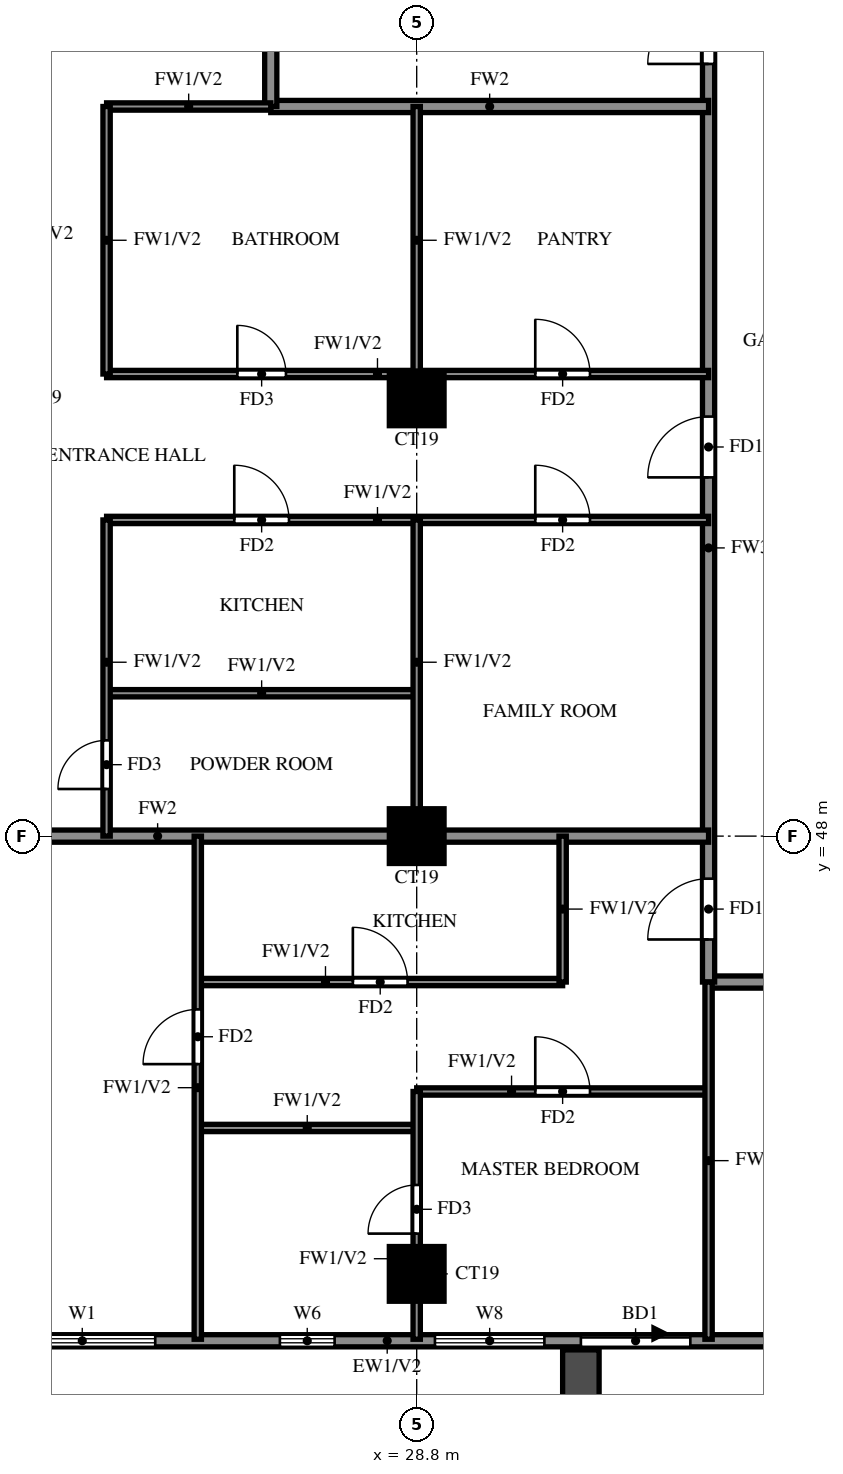
"""IFC4 building model, lengths in metres.
Left out: names, types, materials, properties, quantities, classifications, styles, units other than length and angle.
Written with IfcOpenShell. Run it as: python <this file> out.ifc"""

import sys

from ifc_helpers import new_model, si_unit, direction, frame, frame_2d, origin, origin_2d, place, context, subcontext, project, spatial, rectangle, extrude, source, transform, mapped, element, fill, save


model = new_model("IFC4")
c1 = context("Model", 3, precision=1e-05, world=origin(), true_north=direction((0.0, 1.0)))
c2 = subcontext(c1, "Body", "Model", "MODEL_VIEW")
j1 = project(units=[si_unit("LENGTHUNIT", "METRE"), si_unit("PLANEANGLEUNIT", "RADIAN")], contexts=[c1])
p1 = place(None, origin())
s1 = spatial("IfcSite", under=j1, at=p1, CompositionType="ELEMENT")
p2 = place(p1, origin())
s2 = spatial("IfcBuilding", under=s1, at=p2, CompositionType="ELEMENT")
p3 = place(p2, frame((0.0, 0.0, 195.5)))
s3 = spatial("IfcBuildingStorey", under=s2, at=p3, CompositionType="ELEMENT", Elevation=195.5)
m1 = source(origin(), c2, "Body", "SweptSolid", [
    extrude(rectangle(XDim=0.9, YDim=0.9, at=origin_2d()), origin(), (0.0, 0.0, 1.0), 3.2),
])
for number, where, z_axis, x_axis in (
    (1, (28.8, 40.8, 0.0), (0.0, 0.0, 1.0), (1.0, 0.0, 0.0)),
    (2, (28.8, 48.0, 0.0), (0.0, 0.0, 1.0), (1.0, 0.0, 0.0)),
    (3, (28.8, 55.2, 0.0), (0.0, 0.0, 1.0), (1.0, 0.0, 0.0)),
):
    element("IfcColumn", number, at=place(p3, frame(where, z_axis=z_axis, x_axis=x_axis)), inside=s3, PredefinedType="COLUMN", context=c2, shape_type="MappedRepresentation", body=[
        mapped(m1, transform((0.0, 0.0, 0.0))),
    ])
p4 = place(p3, frame((18.2, 39.7, 0.0), z_axis=(0.0, 0.0, 1.0), x_axis=(1.0, 0.0, 0.0)))
e4 = element("IfcWall", 4, at=p4, inside=s3, PredefinedType="SOLIDWALL", context=c2, shape_type="SweptSolid", body=[
    extrude(rectangle(XDim=23.8, YDim=0.2, at=frame_2d((11.9, 0.0))), origin(), (0.0, 0.0, 1.0), 3.2),
])
p5 = place(p4, frame((13.3, 0.0, 0.0)))
e5 = element("IfcOpeningElement", 5, at=p5, cuts=e4, PredefinedType="OPENING", context=c2, shape_type="SweptSolid", body=[
    extrude(rectangle(XDim=1.8, YDim=2.4, at=frame_2d((0.9, 1.2))), frame((0.0, 0.11, 0.0), z_axis=(0.0, -1.0, 0.0), x_axis=(1.0, 0.0, 0.0)), (0.0, 0.0, 1.0), 0.22),
])
p6 = place(p4, frame((0.9, 0.0, 0.6)))
e6 = element("IfcOpeningElement", 6, at=p6, cuts=e4, PredefinedType="OPENING", context=c2, shape_type="SweptSolid", body=[
    extrude(rectangle(XDim=2.4, YDim=2.4, at=frame_2d((1.2, 1.2))), frame((0.0, 0.11, 0.0), z_axis=(0.0, -1.0, 0.0), x_axis=(1.0, 0.0, 0.0)), (0.0, 0.0, 1.0), 0.22),
])
p7 = place(p4, frame((3.9, 0.0, 0.6)))
e7 = element("IfcOpeningElement", 7, at=p7, cuts=e4, PredefinedType="OPENING", context=c2, shape_type="SweptSolid", body=[
    extrude(rectangle(XDim=2.4, YDim=2.4, at=frame_2d((1.2, 1.2))), frame((0.0, 0.11, 0.0), z_axis=(0.0, -1.0, 0.0), x_axis=(1.0, 0.0, 0.0)), (0.0, 0.0, 1.0), 0.22),
])
p8 = place(p4, frame((10.9, 0.0, 0.6)))
e8 = element("IfcOpeningElement", 8, at=p8, cuts=e4, PredefinedType="OPENING", context=c2, shape_type="SweptSolid", body=[
    extrude(rectangle(XDim=1.8, YDim=2.4, at=frame_2d((0.9, 1.2))), frame((0.0, 0.11, 0.0), z_axis=(0.0, -1.0, 0.0), x_axis=(1.0, 0.0, 0.0)), (0.0, 0.0, 1.0), 0.22),
])
p9 = place(p4, frame((8.35, 0.0, 1.5)))
e9 = element("IfcOpeningElement", 9, at=p9, cuts=e4, PredefinedType="OPENING", context=c2, shape_type="SweptSolid", body=[
    extrude(rectangle(XDim=0.9, YDim=0.9, at=frame_2d((0.45, 0.45))), frame((0.0, 0.11, 0.0), z_axis=(0.0, -1.0, 0.0), x_axis=(1.0, 0.0, 0.0)), (0.0, 0.0, 1.0), 0.22),
])
p10 = place(p3, frame((31.5, 39.55, 0.0), z_axis=(0.0, 0.0, 1.0), x_axis=(0.0, -1.0, 0.0)))
e10 = element("IfcWall", 10, at=p10, inside=s3, PredefinedType="SOLIDWALL", context=c2, shape_type="SweptSolid", body=[
    extrude(rectangle(XDim=2.65, YDim=0.6, at=frame_2d((1.325, 0.0))), origin(), (0.0, 0.0, 1.0), 2.85),
])
p11 = place(p3, frame((33.6, 45.6, 0.0), z_axis=(0.0, 0.0, 1.0), x_axis=(1.0, 0.0, 0.0)))
e11 = element("IfcWall", 11, at=p11, inside=s3, PredefinedType="SOLIDWALL", context=c2, shape_type="SweptSolid", body=[
    extrude(rectangle(XDim=7.2, YDim=0.2, at=frame_2d((3.6, 0.0))), origin(), (0.0, 0.0, 1.0), 3.2),
])
p12 = place(p11, frame((3.15, 0.0, 0.0)))
e12 = element("IfcOpeningElement", 12, at=p12, cuts=e11, PredefinedType="OPENING", context=c2, shape_type="SweptSolid", body=[
    extrude(rectangle(XDim=0.9, YDim=2.1, at=frame_2d((0.45, 1.05))), frame((0.0, 0.11, 0.0), z_axis=(0.0, -1.0, 0.0), x_axis=(1.0, 0.0, 0.0)), (0.0, 0.0, 1.0), 0.22),
])
p13 = place(p3, frame((33.6, 45.6, 0.0), z_axis=(0.0, 0.0, 1.0), x_axis=(0.0, 1.0, 0.0)))
e13 = element("IfcWall", 13, at=p13, inside=s3, PredefinedType="SOLIDWALL", context=c2, shape_type="SweptSolid", body=[
    extrude(rectangle(XDim=16.8, YDim=0.2, at=frame_2d((8.4, 0.0))), origin(), (0.0, 0.0, 1.0), 3.2),
])
p14 = place(p13, frame((0.7, 0.0, 0.0)))
e14 = element("IfcOpeningElement", 14, at=p14, cuts=e13, PredefinedType="OPENING", context=c2, shape_type="SweptSolid", body=[
    extrude(rectangle(XDim=1.0, YDim=2.1, at=frame_2d((0.5, 1.05))), frame((0.0, 0.11, 0.0), z_axis=(0.0, -1.0, 0.0), x_axis=(1.0, 0.0, 0.0)), (0.0, 0.0, 1.0), 0.22),
])
p15 = place(p13, frame((8.3, 0.0, 0.0)))
e15 = element("IfcOpeningElement", 15, at=p15, cuts=e13, PredefinedType="OPENING", context=c2, shape_type="SweptSolid", body=[
    extrude(rectangle(XDim=1.0, YDim=2.1, at=frame_2d((0.5, 1.05))), frame((0.0, 0.11, 0.0), z_axis=(0.0, -1.0, 0.0), x_axis=(1.0, 0.0, 0.0)), (0.0, 0.0, 1.0), 0.22),
])
p16 = place(p13, frame((15.1, 0.0, 0.0)))
e16 = element("IfcOpeningElement", 16, at=p16, cuts=e13, PredefinedType="OPENING", context=c2, shape_type="SweptSolid", body=[
    extrude(rectangle(XDim=1.0, YDim=2.1, at=frame_2d((0.5, 1.05))), frame((0.0, 0.11, 0.0), z_axis=(0.0, -1.0, 0.0), x_axis=(1.0, 0.0, 0.0)), (0.0, 0.0, 1.0), 0.22),
])
p17 = place(p3, frame((14.525, 48.0, 0.0), z_axis=(0.0, 0.0, 1.0), x_axis=(1.0, 0.0, 0.0)))
e17 = element("IfcWall", 17, at=p17, inside=s3, PredefinedType="SOLIDWALL", context=c2, shape_type="SweptSolid", body=[
    extrude(rectangle(XDim=19.075, YDim=0.2, at=frame_2d((9.538, 0.0))), origin(), (0.0, 0.0, 1.0), 3.2),
])
p18 = place(p3, frame((26.4, 60.0, 0.0), z_axis=(0.0, 0.0, 1.0), x_axis=(1.0, 0.0, 0.0)))
e18 = element("IfcWall", 18, at=p18, inside=s3, PredefinedType="SOLIDWALL", context=c2, shape_type="SweptSolid", body=[
    extrude(rectangle(XDim=7.2, YDim=0.2, at=frame_2d((3.6, 0.0))), origin(), (0.0, 0.0, 1.0), 3.2),
])
p19 = place(p3, frame((26.4, 60.0, 0.0), z_axis=(0.0, 0.0, 1.0), x_axis=(0.0, 1.0, 0.0)))
e19 = element("IfcWall", 19, at=p19, inside=s3, PredefinedType="SOLIDWALL", context=c2, shape_type="SweptSolid", body=[
    extrude(rectangle(XDim=2.4, YDim=0.2, at=frame_2d((1.2, 0.0))), origin(), (0.0, 0.0, 1.0), 3.2),
])
p20 = place(p3, frame((25.2, 43.2, 0.0), z_axis=(0.0, 0.0, 1.0), x_axis=(1.0, 0.0, 0.0)))
e20 = element("IfcWall", 20, at=p20, inside=s3, PredefinedType="PARTITIONING", context=c2, shape_type="SweptSolid", body=[
    extrude(rectangle(XDim=3.6, YDim=0.12, at=frame_2d((1.8, 0.0))), origin(), (0.0, 0.0, 1.0), 3.2),
])
p21 = place(p3, frame((28.8, 43.8, 0.0), z_axis=(0.0, 0.0, 1.0), x_axis=(1.0, 0.0, 0.0)))
e21 = element("IfcWall", 21, at=p21, inside=s3, PredefinedType="PARTITIONING", context=c2, shape_type="SweptSolid", body=[
    extrude(rectangle(XDim=4.8, YDim=0.12, at=frame_2d((2.4, 0.0))), origin(), (0.0, 0.0, 1.0), 3.2),
])
p22 = place(p21, frame((1.95, 0.0, 0.0)))
e22 = element("IfcOpeningElement", 22, at=p22, cuts=e21, PredefinedType="OPENING", context=c2, shape_type="SweptSolid", body=[
    extrude(rectangle(XDim=0.9, YDim=2.1, at=frame_2d((0.45, 1.05))), frame((0.0, 0.07, 0.0), z_axis=(0.0, -1.0, 0.0), x_axis=(1.0, 0.0, 0.0)), (0.0, 0.0, 1.0), 0.14),
])
p23 = place(p3, frame((25.2, 45.6, 0.0), z_axis=(0.0, 0.0, 1.0), x_axis=(1.0, 0.0, 0.0)))
e23 = element("IfcWall", 23, at=p23, inside=s3, PredefinedType="PARTITIONING", context=c2, shape_type="SweptSolid", body=[
    extrude(rectangle(XDim=6.0, YDim=0.12, at=frame_2d((3.0, 0.0))), origin(), (0.0, 0.0, 1.0), 3.2),
])
p24 = place(p23, frame((2.55, 0.0, 0.0)))
e24 = element("IfcOpeningElement", 24, at=p24, cuts=e23, PredefinedType="OPENING", context=c2, shape_type="SweptSolid", body=[
    extrude(rectangle(XDim=0.9, YDim=2.1, at=frame_2d((0.45, 1.05))), frame((0.0, 0.07, 0.0), z_axis=(0.0, -1.0, 0.0), x_axis=(1.0, 0.0, 0.0)), (0.0, 0.0, 1.0), 0.14),
])
p25 = place(p3, frame((23.7, 50.35, 0.0), z_axis=(0.0, 0.0, 1.0), x_axis=(1.0, 0.0, 0.0)))
e25 = element("IfcWall", 25, at=p25, inside=s3, PredefinedType="PARTITIONING", context=c2, shape_type="SweptSolid", body=[
    extrude(rectangle(XDim=5.1, YDim=0.12, at=frame_2d((2.55, 0.0))), origin(), (0.0, 0.0, 1.0), 3.2),
])
p26 = place(p3, frame((23.7, 53.2, 0.0), z_axis=(0.0, 0.0, 1.0), x_axis=(1.0, 0.0, 0.0)))
e26 = element("IfcWall", 26, at=p26, inside=s3, PredefinedType="PARTITIONING", context=c2, shape_type="SweptSolid", body=[
    extrude(rectangle(XDim=9.9, YDim=0.12, at=frame_2d((4.95, 0.0))), origin(), (0.0, 0.0, 1.0), 3.2),
])
p27 = place(p26, frame((2.1, 0.0, 0.0)))
e27 = element("IfcOpeningElement", 27, at=p27, cuts=e26, PredefinedType="OPENING", context=c2, shape_type="SweptSolid", body=[
    extrude(rectangle(XDim=0.9, YDim=2.1, at=frame_2d((0.45, 1.05))), frame((0.0, 0.07, 0.0), z_axis=(0.0, -1.0, 0.0), x_axis=(1.0, 0.0, 0.0)), (0.0, 0.0, 1.0), 0.14),
])
p28 = place(p26, frame((7.05, 0.0, 0.0)))
e28 = element("IfcOpeningElement", 28, at=p28, cuts=e26, PredefinedType="OPENING", context=c2, shape_type="SweptSolid", body=[
    extrude(rectangle(XDim=0.9, YDim=2.1, at=frame_2d((0.45, 1.05))), frame((0.0, 0.07, 0.0), z_axis=(0.0, -1.0, 0.0), x_axis=(1.0, 0.0, 0.0)), (0.0, 0.0, 1.0), 0.14),
])
p29 = place(p3, frame((23.7, 55.6, 0.0), z_axis=(0.0, 0.0, 1.0), x_axis=(1.0, 0.0, 0.0)))
e29 = element("IfcWall", 29, at=p29, inside=s3, PredefinedType="PARTITIONING", context=c2, shape_type="SweptSolid", body=[
    extrude(rectangle(XDim=9.9, YDim=0.12, at=frame_2d((4.95, 0.0))), origin(), (0.0, 0.0, 1.0), 3.2),
])
p30 = place(p29, frame((2.15, 0.0, 0.0)))
e30 = element("IfcOpeningElement", 30, at=p30, cuts=e29, PredefinedType="OPENING", context=c2, shape_type="SweptSolid", body=[
    extrude(rectangle(XDim=0.8, YDim=2.1, at=frame_2d((0.4, 1.05))), frame((0.0, 0.07, 0.0), z_axis=(0.0, -1.0, 0.0), x_axis=(1.0, 0.0, 0.0)), (0.0, 0.0, 1.0), 0.14),
])
p31 = place(p29, frame((7.05, 0.0, 0.0)))
e31 = element("IfcOpeningElement", 31, at=p31, cuts=e29, PredefinedType="OPENING", context=c2, shape_type="SweptSolid", body=[
    extrude(rectangle(XDim=0.9, YDim=2.1, at=frame_2d((0.45, 1.05))), frame((0.0, 0.07, 0.0), z_axis=(0.0, -1.0, 0.0), x_axis=(1.0, 0.0, 0.0)), (0.0, 0.0, 1.0), 0.14),
])
p32 = place(p3, frame((23.7, 60.0, 0.0), z_axis=(0.0, 0.0, 1.0), x_axis=(1.0, 0.0, 0.0)))
e32 = element("IfcWall", 32, at=p32, inside=s3, PredefinedType="PARTITIONING", context=c2, shape_type="SweptSolid", body=[
    extrude(rectangle(XDim=2.7, YDim=0.12, at=frame_2d((1.35, 0.0))), origin(), (0.0, 0.0, 1.0), 3.2),
])
p33 = place(p3, frame((23.7, 48.0, 0.0), z_axis=(0.0, 0.0, 1.0), x_axis=(0.0, 1.0, 0.0)))
e33 = element("IfcWall", 33, at=p33, inside=s3, PredefinedType="PARTITIONING", context=c2, shape_type="SweptSolid", body=[
    extrude(rectangle(XDim=5.2, YDim=0.12, at=frame_2d((2.6, 0.0))), origin(), (0.0, 0.0, 1.0), 3.2),
])
p34 = place(p33, frame((0.775, 0.0, 0.0)))
e34 = element("IfcOpeningElement", 34, at=p34, cuts=e33, PredefinedType="OPENING", context=c2, shape_type="SweptSolid", body=[
    extrude(rectangle(XDim=0.8, YDim=2.1, at=frame_2d((0.4, 1.05))), frame((0.0, 0.07, 0.0), z_axis=(0.0, -1.0, 0.0), x_axis=(1.0, 0.0, 0.0)), (0.0, 0.0, 1.0), 0.14),
])
p35 = place(p3, frame((23.7, 55.6, 0.0), z_axis=(0.0, 0.0, 1.0), x_axis=(0.0, 1.0, 0.0)))
e35 = element("IfcWall", 35, at=p35, inside=s3, PredefinedType="PARTITIONING", context=c2, shape_type="SweptSolid", body=[
    extrude(rectangle(XDim=4.4, YDim=0.12, at=frame_2d((2.2, 0.0))), origin(), (0.0, 0.0, 1.0), 3.2),
])
p36 = place(p3, frame((25.2, 39.725, 0.0), z_axis=(0.0, 0.0, 1.0), x_axis=(0.0, 1.0, 0.0)))
e36 = element("IfcWall", 36, at=p36, inside=s3, PredefinedType="PARTITIONING", context=c2, shape_type="SweptSolid", body=[
    extrude(rectangle(XDim=8.275, YDim=0.12, at=frame_2d((4.137, 0.0))), origin(), (0.0, 0.0, 1.0), 3.2),
])
p37 = place(p36, frame((4.525, 0.0, 0.0)))
e37 = element("IfcOpeningElement", 37, at=p37, cuts=e36, PredefinedType="OPENING", context=c2, shape_type="SweptSolid", body=[
    extrude(rectangle(XDim=0.9, YDim=2.1, at=frame_2d((0.45, 1.05))), frame((0.0, 0.07, 0.0), z_axis=(0.0, -1.0, 0.0), x_axis=(1.0, 0.0, 0.0)), (0.0, 0.0, 1.0), 0.14),
])
p38 = place(p3, frame((28.8, 39.725, 0.0), z_axis=(0.0, 0.0, 1.0), x_axis=(0.0, 1.0, 0.0)))
e38 = element("IfcWall", 38, at=p38, inside=s3, PredefinedType="PARTITIONING", context=c2, shape_type="SweptSolid", body=[
    extrude(rectangle(XDim=4.075, YDim=0.12, at=frame_2d((2.038, 0.0))), origin(), (0.0, 0.0, 1.0), 3.2),
])
p39 = place(p38, frame((1.738, 0.0, 0.0)))
e39 = element("IfcOpeningElement", 39, at=p39, cuts=e38, PredefinedType="OPENING", context=c2, shape_type="SweptSolid", body=[
    extrude(rectangle(XDim=0.8, YDim=2.1, at=frame_2d((0.4, 1.05))), frame((0.0, 0.07, 0.0), z_axis=(0.0, -1.0, 0.0), x_axis=(1.0, 0.0, 0.0)), (0.0, 0.0, 1.0), 0.14),
])
p40 = place(p3, frame((28.8, 48.0, 0.0), z_axis=(0.0, 0.0, 1.0), x_axis=(0.0, 1.0, 0.0)))
e40 = element("IfcWall", 40, at=p40, inside=s3, PredefinedType="PARTITIONING", context=c2, shape_type="SweptSolid", body=[
    extrude(rectangle(XDim=5.2, YDim=0.12, at=frame_2d((2.6, 0.0))), origin(), (0.0, 0.0, 1.0), 3.2),
])
p41 = place(p3, frame((28.8, 55.6, 0.0), z_axis=(0.0, 0.0, 1.0), x_axis=(0.0, 1.0, 0.0)))
e41 = element("IfcWall", 41, at=p41, inside=s3, PredefinedType="PARTITIONING", context=c2, shape_type="SweptSolid", body=[
    extrude(rectangle(XDim=4.4, YDim=0.12, at=frame_2d((2.2, 0.0))), origin(), (0.0, 0.0, 1.0), 3.2),
])
p42 = place(p3, frame((31.2, 45.6, 0.0), z_axis=(0.0, 0.0, 1.0), x_axis=(0.0, 1.0, 0.0)))
e42 = element("IfcWall", 42, at=p42, inside=s3, PredefinedType="PARTITIONING", context=c2, shape_type="SweptSolid", body=[
    extrude(rectangle(XDim=2.4, YDim=0.12, at=frame_2d((1.2, 0.0))), origin(), (0.0, 0.0, 1.0), 3.2),
])
p43 = place(p3, frame((33.6, 39.725, 0.0), z_axis=(0.0, 0.0, 1.0), x_axis=(0.0, 1.0, 0.0)))
e43 = element("IfcWall", 43, at=p43, inside=s3, PredefinedType="PARTITIONING", context=c2, shape_type="SweptSolid", body=[
    extrude(rectangle(XDim=5.875, YDim=0.12, at=frame_2d((2.938, 0.0))), origin(), (0.0, 0.0, 1.0), 3.2),
])
p44 = place(p5, origin())
e44 = element("IfcDoor", 44, at=p44, inside=s3, OperationType="DOUBLE_DOOR_SLIDING", PredefinedType="DOOR", context=c2, shape_type="SweptSolid", body=[
    extrude(rectangle(XDim=1.8, YDim=2.4, at=frame_2d((0.9, 1.2))), frame((0.0, 0.025, 0.0), z_axis=(0.0, -1.0, 0.0), x_axis=(1.0, 0.0, 0.0)), (0.0, 0.0, 1.0), 0.05),
])
fill(e5, e44)
p45 = place(p7, origin())
e45 = element("IfcWindow", 45, at=p45, inside=s3, PartitioningType="DOUBLE_PANEL_VERTICAL", PredefinedType="WINDOW", context=c2, shape_type="SweptSolid", body=[
    extrude(rectangle(XDim=2.4, YDim=2.4, at=frame_2d((1.2, 1.2))), frame((0.0, 0.03, 0.0), z_axis=(0.0, -1.0, 0.0), x_axis=(1.0, 0.0, 0.0)), (0.0, 0.0, 1.0), 0.06),
])
fill(e7, e45)
p46 = place(p8, origin())
e46 = element("IfcWindow", 46, at=p46, inside=s3, PartitioningType="DOUBLE_PANEL_VERTICAL", PredefinedType="WINDOW", context=c2, shape_type="SweptSolid", body=[
    extrude(rectangle(XDim=1.8, YDim=2.4, at=frame_2d((0.9, 1.2))), frame((0.0, 0.03, 0.0), z_axis=(0.0, -1.0, 0.0), x_axis=(1.0, 0.0, 0.0)), (0.0, 0.0, 1.0), 0.06),
])
fill(e8, e46)
p47 = place(p9, origin())
e47 = element("IfcWindow", 47, at=p47, inside=s3, PartitioningType="SINGLE_PANEL", PredefinedType="WINDOW", context=c2, shape_type="SweptSolid", body=[
    extrude(rectangle(XDim=0.9, YDim=0.9, at=frame_2d((0.45, 0.45))), frame((0.0, 0.03, 0.0), z_axis=(0.0, -1.0, 0.0), x_axis=(1.0, 0.0, 0.0)), (0.0, 0.0, 1.0), 0.06),
])
fill(e9, e47)
p48 = place(p14, origin())
e48 = element("IfcDoor", 48, at=p48, inside=s3, OperationType="SINGLE_SWING_LEFT", PredefinedType="DOOR", context=c2, shape_type="SweptSolid", body=[
    extrude(rectangle(XDim=1.0, YDim=2.1, at=frame_2d((0.5, 1.05))), frame((0.0, 0.025, 0.0), z_axis=(0.0, -1.0, 0.0), x_axis=(1.0, 0.0, 0.0)), (0.0, 0.0, 1.0), 0.05),
])
fill(e14, e48)
p49 = place(p37, origin())
e49 = element("IfcDoor", 49, at=p49, inside=s3, OperationType="SINGLE_SWING_LEFT", PredefinedType="DOOR", context=c2, shape_type="SweptSolid", body=[
    extrude(rectangle(XDim=0.9, YDim=2.1, at=frame_2d((0.45, 1.05))), frame((0.0, 0.025, 0.0), z_axis=(0.0, -1.0, 0.0), x_axis=(1.0, 0.0, 0.0)), (0.0, 0.0, 1.0), 0.05),
])
fill(e37, e49)
p50 = place(p22, origin())
e50 = element("IfcDoor", 50, at=p50, inside=s3, OperationType="SINGLE_SWING_RIGHT", PredefinedType="DOOR", context=c2, shape_type="SweptSolid", body=[
    extrude(rectangle(XDim=0.9, YDim=2.1, at=frame_2d((0.45, 1.05))), frame((0.0, 0.025, 0.0), z_axis=(0.0, -1.0, 0.0), x_axis=(1.0, 0.0, 0.0)), (0.0, 0.0, 1.0), 0.05),
])
fill(e22, e50)
p51 = place(p39, origin())
e51 = element("IfcDoor", 51, at=p51, inside=s3, OperationType="SINGLE_SWING_RIGHT", PredefinedType="DOOR", context=c2, shape_type="SweptSolid", body=[
    extrude(rectangle(XDim=0.8, YDim=2.1, at=frame_2d((0.4, 1.05))), frame((0.0, 0.025, 0.0), z_axis=(0.0, -1.0, 0.0), x_axis=(1.0, 0.0, 0.0)), (0.0, 0.0, 1.0), 0.05),
])
fill(e39, e51)
p52 = place(p24, origin())
e52 = element("IfcDoor", 52, at=p52, inside=s3, OperationType="SINGLE_SWING_LEFT", PredefinedType="DOOR", context=c2, shape_type="SweptSolid", body=[
    extrude(rectangle(XDim=0.9, YDim=2.1, at=frame_2d((0.45, 1.05))), frame((0.0, 0.025, 0.0), z_axis=(0.0, -1.0, 0.0), x_axis=(1.0, 0.0, 0.0)), (0.0, 0.0, 1.0), 0.05),
])
fill(e24, e52)
p53 = place(p15, origin())
e53 = element("IfcDoor", 53, at=p53, inside=s3, OperationType="SINGLE_SWING_LEFT", PredefinedType="DOOR", context=c2, shape_type="SweptSolid", body=[
    extrude(rectangle(XDim=1.0, YDim=2.1, at=frame_2d((0.5, 1.05))), frame((0.0, 0.025, 0.0), z_axis=(0.0, -1.0, 0.0), x_axis=(1.0, 0.0, 0.0)), (0.0, 0.0, 1.0), 0.05),
])
fill(e15, e53)
p54 = place(p34, origin())
e54 = element("IfcDoor", 54, at=p54, inside=s3, OperationType="SINGLE_SWING_LEFT", PredefinedType="DOOR", context=c2, shape_type="SweptSolid", body=[
    extrude(rectangle(XDim=0.8, YDim=2.1, at=frame_2d((0.4, 1.05))), frame((0.0, 0.025, 0.0), z_axis=(0.0, -1.0, 0.0), x_axis=(1.0, 0.0, 0.0)), (0.0, 0.0, 1.0), 0.05),
])
fill(e34, e54)
p55 = place(p27, origin())
e55 = element("IfcDoor", 55, at=p55, inside=s3, OperationType="SINGLE_SWING_RIGHT", PredefinedType="DOOR", context=c2, shape_type="SweptSolid", body=[
    extrude(rectangle(XDim=0.9, YDim=2.1, at=frame_2d((0.45, 1.05))), frame((0.0, 0.025, 0.0), z_axis=(0.0, -1.0, 0.0), x_axis=(1.0, 0.0, 0.0)), (0.0, 0.0, 1.0), 0.05),
])
fill(e27, e55)
p56 = place(p30, origin())
e56 = element("IfcDoor", 56, at=p56, inside=s3, OperationType="SINGLE_SWING_LEFT", PredefinedType="DOOR", context=c2, shape_type="SweptSolid", body=[
    extrude(rectangle(XDim=0.8, YDim=2.1, at=frame_2d((0.4, 1.05))), frame((0.0, 0.025, 0.0), z_axis=(0.0, -1.0, 0.0), x_axis=(1.0, 0.0, 0.0)), (0.0, 0.0, 1.0), 0.05),
])
fill(e30, e56)
p57 = place(p28, origin())
e57 = element("IfcDoor", 57, at=p57, inside=s3, OperationType="SINGLE_SWING_LEFT", PredefinedType="DOOR", context=c2, shape_type="SweptSolid", body=[
    extrude(rectangle(XDim=0.9, YDim=2.1, at=frame_2d((0.45, 1.05))), frame((0.0, 0.025, 0.0), z_axis=(0.0, -1.0, 0.0), x_axis=(1.0, 0.0, 0.0)), (0.0, 0.0, 1.0), 0.05),
])
fill(e28, e57)
p58 = place(p31, origin())
e58 = element("IfcDoor", 58, at=p58, inside=s3, OperationType="SINGLE_SWING_RIGHT", PredefinedType="DOOR", context=c2, shape_type="SweptSolid", body=[
    extrude(rectangle(XDim=0.9, YDim=2.1, at=frame_2d((0.45, 1.05))), frame((0.0, 0.025, 0.0), z_axis=(0.0, -1.0, 0.0), x_axis=(1.0, 0.0, 0.0)), (0.0, 0.0, 1.0), 0.05),
])
fill(e31, e58)
p59 = place(p16, origin())
e59 = element("IfcDoor", 59, at=p59, inside=s3, OperationType="SINGLE_SWING_LEFT", PredefinedType="DOOR", context=c2, shape_type="SweptSolid", body=[
    extrude(rectangle(XDim=1.0, YDim=2.1, at=frame_2d((0.5, 1.05))), frame((0.0, 0.025, 0.0), z_axis=(0.0, -1.0, 0.0), x_axis=(1.0, 0.0, 0.0)), (0.0, 0.0, 1.0), 0.05),
])
fill(e16, e59)
save(model, sys.argv[1])
